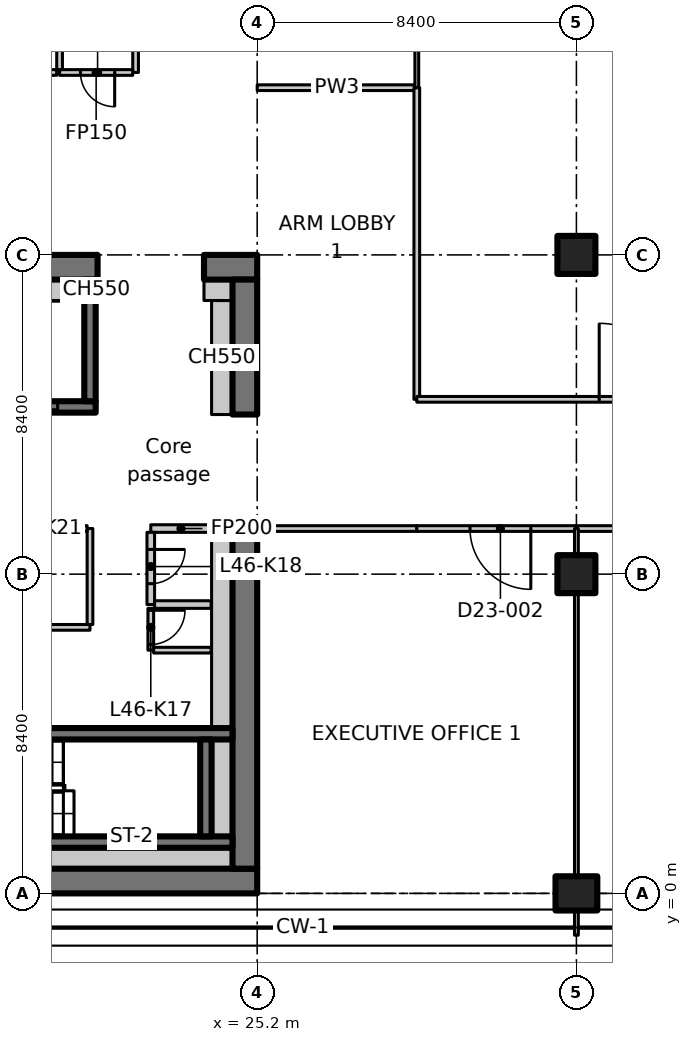
"""IFC4 building model, lengths in metres.
Left out: names, types, materials, properties, quantities, classifications, styles, units other than length and angle.
Written with IfcOpenShell. Run it as: python <this file> out.ifc"""

import sys

from ifc_helpers import new_model, si_unit, direction, frame, frame_2d, origin, origin_2d, place, context, subcontext, project, spatial, polyline, rectangle, outline, extrude, element, fill, save


model = new_model("IFC4")
c1 = context("Model", 3, precision=1e-05, world=origin(), true_north=direction((0.0, 1.0)))
c2 = subcontext(c1, "Body", "Model", "MODEL_VIEW")
j1 = project(units=[si_unit("LENGTHUNIT", "METRE"), si_unit("PLANEANGLEUNIT", "RADIAN")], contexts=[c1])
p1 = place(None, origin())
s1 = spatial("IfcSite", under=j1, at=p1, CompositionType="ELEMENT")
p2 = place(p1, origin())
s2 = spatial("IfcBuilding", under=s1, at=p2, CompositionType="ELEMENT")
p3 = place(p2, frame((0.0, 0.0, 184.8)))
s3 = spatial("IfcBuildingStorey", under=s2, at=p3, CompositionType="ELEMENT", Elevation=184.8)
p4 = place(p3, frame((33.6, 0.0, 0.0), z_axis=(0.0, 0.0, 1.0), x_axis=(0.0, 1.0, 0.0)))
e1 = element("IfcColumn", 1, at=p4, inside=s3, PredefinedType="COLUMN", context=c2, shape_type="SweptSolid", body=[
    extrude(rectangle(XDim=0.9, YDim=1.1, at=origin_2d()), origin(), (0.0, 0.0, 1.0), 3.35),
])
for number, where, z_axis, x_axis in (
    (2, (33.6, 8.4, 0.0), (0.0, 0.0, 1.0), (1.0, 0.0, 0.0)),
    (3, (33.6, 16.8, 0.0), (0.0, 0.0, 1.0), (1.0, 0.0, 0.0)),
):
    element("IfcColumn", number, at=place(p3, frame(where, z_axis=z_axis, x_axis=x_axis)), inside=s3, PredefinedType="COLUMN", context=c2, shape_type="SweptSolid", body=[
        extrude(rectangle(XDim=1.0, YDim=1.0, at=origin_2d()), origin(), (0.0, 0.0, 1.0), 3.35),
    ])
p5 = place(p3, frame((7.286, 0.325, 0.0), z_axis=(0.0, 0.0, 1.0), x_axis=(1.0, 0.0, 0.0)))
e4 = element("IfcWall", 4, at=p5, inside=s3, PredefinedType="SHEAR", context=c2, shape_type="SweptSolid", body=[
    extrude(rectangle(XDim=17.914, YDim=0.65, at=frame_2d((8.957, 0.0))), origin(), (0.0, 0.0, 1.0), 3.35),
])
p6 = place(p3, frame((-1.1, 16.475, 0.0), z_axis=(0.0, 0.0, 1.0), x_axis=(1.0, 0.0, 0.0)))
e5 = element("IfcWall", 5, at=p6, inside=s3, PredefinedType="SHEAR", context=c2, shape_type="SweptSolid", body=[
    extrude(rectangle(XDim=22.1, YDim=0.65, at=frame_2d((11.05, 0.0))), origin(), (0.0, 0.0, 1.0), 3.35),
])
p7 = place(p6, frame((3.15, 0.0, 0.0)))
e6 = element("IfcOpeningElement", 6, at=p7, cuts=e5, PredefinedType="OPENING", context=c2, shape_type="SweptSolid", body=[
    extrude(rectangle(XDim=1.1, YDim=2.3, at=frame_2d((0.55, 1.15))), frame((0.0, 0.335, 0.0), z_axis=(0.0, -1.0, 0.0), x_axis=(1.0, 0.0, 0.0)), (0.0, 0.0, 1.0), 0.67),
])
p8 = place(p3, frame((23.8, 16.475, 0.0), z_axis=(0.0, 0.0, 1.0), x_axis=(1.0, 0.0, 0.0)))
e7 = element("IfcWall", 7, at=p8, inside=s3, PredefinedType="SHEAR", context=c2, shape_type="SweptSolid", body=[
    extrude(rectangle(XDim=1.4, YDim=0.65, at=frame_2d((0.7, 0.0))), origin(), (0.0, 0.0, 1.0), 3.35),
])
p9 = place(p3, frame((24.875, 0.65, 0.0), z_axis=(0.0, 0.0, 1.0), x_axis=(0.0, 1.0, 0.0)))
e8 = element("IfcWall", 8, at=p9, inside=s3, PredefinedType="SHEAR", context=c2, shape_type="SweptSolid", body=[
    extrude(rectangle(XDim=9.15, YDim=0.65, at=frame_2d((4.575, 0.0))), origin(), (0.0, 0.0, 1.0), 3.35),
])
p10 = place(p3, frame((24.875, 12.6, 0.0), z_axis=(0.0, 0.0, 1.0), x_axis=(0.0, 1.0, 0.0)))
e9 = element("IfcWall", 9, at=p10, inside=s3, PredefinedType="SHEAR", context=c2, shape_type="SweptSolid", body=[
    extrude(rectangle(XDim=3.55, YDim=0.65, at=frame_2d((1.775, 0.0))), origin(), (0.0, 0.0, 1.0), 3.35),
])
p11 = place(p3, frame((24.275, 12.6, 0.0), z_axis=(0.0, 0.0, 1.0), x_axis=(0.0, 1.0, 0.0)))
e10 = element("IfcWall", 10, at=p11, inside=s3, PredefinedType="PARTITIONING", context=c2, shape_type="SweptSolid", body=[
    extrude(rectangle(XDim=3.0, YDim=0.55, at=frame_2d((1.5, 0.0))), origin(), (0.0, 0.0, 1.0), 3.35),
])
p12 = place(p3, frame((23.8, 15.875, 0.0), z_axis=(0.0, 0.0, 1.0), x_axis=(1.0, 0.0, 0.0)))
e11 = element("IfcWall", 11, at=p12, inside=s3, PredefinedType="PARTITIONING", context=c2, shape_type="SweptSolid", body=[
    extrude(rectangle(XDim=0.75, YDim=0.55, at=frame_2d((0.375, 0.0))), origin(), (0.0, 0.0, 1.0), 3.35),
])
p13 = place(p3, frame((17.85, 12.8, 0.0), z_axis=(0.0, 0.0, 1.0), x_axis=(1.0, 0.0, 0.0)))
e12 = element("IfcWall", 12, at=p13, inside=s3, PredefinedType="SHEAR", context=c2, shape_type="SweptSolid", body=[
    extrude(rectangle(XDim=3.1, YDim=0.3, at=frame_2d((1.55, 0.0))), origin(), (0.0, 0.0, 1.0), 3.35),
])
p14 = place(p13, frame((1.0, 0.0, 0.0)))
e13 = element("IfcOpeningElement", 13, at=p14, cuts=e12, PredefinedType="OPENING", context=c2, shape_type="SweptSolid", body=[
    extrude(rectangle(XDim=1.1, YDim=2.3, at=frame_2d((0.55, 1.15))), frame((0.0, 0.16, 0.0), z_axis=(0.0, -1.0, 0.0), x_axis=(1.0, 0.0, 0.0)), (0.0, 0.0, 1.0), 0.32),
])
p15 = place(p3, frame((20.8, 12.95, 0.0), z_axis=(0.0, 0.0, 1.0), x_axis=(0.0, 1.0, 0.0)))
e14 = element("IfcWall", 14, at=p15, inside=s3, PredefinedType="SHEAR", context=c2, shape_type="SweptSolid", body=[
    extrude(rectangle(XDim=3.2, YDim=0.3, at=frame_2d((1.6, 0.0))), origin(), (0.0, 0.0, 1.0), 3.35),
])
p16 = place(p3, frame((15.8, 1.35, 0.0), z_axis=(0.0, 0.0, 1.0), x_axis=(1.0, 0.0, 0.0)))
e15 = element("IfcWall", 15, at=p16, inside=s3, PredefinedType="SHEAR", context=c2, shape_type="SweptSolid", body=[
    extrude(rectangle(XDim=8.75, YDim=0.3, at=frame_2d((4.375, 0.0))), origin(), (0.0, 0.0, 1.0), 3.35),
])
p17 = place(p3, frame((15.8, 4.2, 0.0), z_axis=(0.0, 0.0, 1.0), x_axis=(1.0, 0.0, 0.0)))
e16 = element("IfcWall", 16, at=p17, inside=s3, PredefinedType="SHEAR", context=c2, shape_type="SweptSolid", body=[
    extrude(rectangle(XDim=8.75, YDim=0.3, at=frame_2d((4.375, 0.0))), origin(), (0.0, 0.0, 1.0), 3.35),
])
p18 = place(p17, frame((0.4, 0.0, 0.0)))
e17 = element("IfcOpeningElement", 17, at=p18, cuts=e16, PredefinedType="OPENING", context=c2, shape_type="SweptSolid", body=[
    extrude(rectangle(XDim=1.0, YDim=2.1, at=frame_2d((0.5, 1.05))), frame((0.0, 0.16, 0.0), z_axis=(0.0, -1.0, 0.0), x_axis=(1.0, 0.0, 0.0)), (0.0, 0.0, 1.0), 0.32),
])
p19 = place(p3, frame((23.85, 1.5, 0.0), z_axis=(0.0, 0.0, 1.0), x_axis=(0.0, 1.0, 0.0)))
e18 = element("IfcWall", 18, at=p19, inside=s3, PredefinedType="SHEAR", context=c2, shape_type="SweptSolid", body=[
    extrude(rectangle(XDim=2.55, YDim=0.3, at=frame_2d((1.275, 0.0))), origin(), (0.0, 0.0, 1.0), 3.35),
])
p20 = place(p3, frame((23.988, 9.6, 0.0), z_axis=(0.0, 0.0, 1.0), x_axis=(-1.0, 0.0, 0.0)))
e19 = element("IfcWall", 19, at=p20, inside=s3, PredefinedType="PARTITIONING", context=c2, shape_type="SweptSolid", body=[
    extrude(rectangle(XDim=1.588, YDim=0.2, at=frame_2d((0.794, 0.0))), origin(), (0.0, 0.0, 1.0), 3.35),
])
p21 = place(p3, frame((22.4, 9.5, 0.0), z_axis=(0.0, 0.0, 1.0), x_axis=(0.0, -1.0, 0.0)))
e20 = element("IfcWall", 20, at=p21, inside=s3, PredefinedType="PARTITIONING", context=c2, shape_type="SweptSolid", body=[
    extrude(rectangle(XDim=1.9, YDim=0.2, at=frame_2d((0.95, 0.0))), origin(), (0.0, 0.0, 1.0), 3.35),
])
p22 = place(p21, frame((0.45, 0.0, 0.0)))
e21 = element("IfcOpeningElement", 21, at=p22, cuts=e20, PredefinedType="OPENING", context=c2, shape_type="SweptSolid", body=[
    extrude(rectangle(XDim=0.9, YDim=2.1, at=frame_2d((0.45, 1.05))), frame((0.0, 0.11, 0.0), z_axis=(0.0, -1.0, 0.0), x_axis=(1.0, 0.0, 0.0)), (0.0, 0.0, 1.0), 0.22),
])
p23 = place(p3, frame((22.5, 7.6, 0.0), z_axis=(0.0, 0.0, 1.0), x_axis=(1.0, 0.0, 0.0)))
e22 = element("IfcWall", 22, at=p23, inside=s3, PredefinedType="PARTITIONING", context=c2, shape_type="SweptSolid", body=[
    extrude(rectangle(XDim=1.488, YDim=0.2, at=frame_2d((0.744, 0.0))), origin(), (0.0, 0.0, 1.0), 3.35),
])
p24 = place(p3, frame((12.5, 7.0, 0.0), z_axis=(0.0, 0.0, 1.0), x_axis=(1.0, 0.0, 0.0)))
e23 = element("IfcWall", 23, at=p24, inside=s3, PredefinedType="PARTITIONING", context=c2, shape_type="SweptSolid", body=[
    extrude(rectangle(XDim=8.3, YDim=0.15, at=frame_2d((4.15, 0.0))), origin(), (0.0, 0.0, 1.0), 3.35),
])
p25 = place(p3, frame((20.8, 7.075, 0.0), z_axis=(0.0, 0.0, 1.0), x_axis=(0.0, 1.0, 0.0)))
e24 = element("IfcWall", 24, at=p25, inside=s3, PredefinedType="PARTITIONING", context=c2, shape_type="SweptSolid", body=[
    extrude(rectangle(XDim=2.525, YDim=0.15, at=frame_2d((1.263, 0.0))), origin(), (0.0, 0.0, 1.0), 3.35),
])
p26 = place(p3, frame((20.725, 9.6, 0.0), z_axis=(0.0, 0.0, 1.0), x_axis=(-1.0, 0.0, 0.0)))
e25 = element("IfcWall", 25, at=p26, inside=s3, PredefinedType="PARTITIONING", context=c2, shape_type="SweptSolid", body=[
    extrude(rectangle(XDim=8.225, YDim=0.15, at=frame_2d((4.113, 0.0))), origin(), (0.0, 0.0, 1.0), 3.35),
])
p27 = place(p26, frame((3.675, 0.0, 0.0)))
e26 = element("IfcOpeningElement", 26, at=p27, cuts=e25, PredefinedType="OPENING", context=c2, shape_type="SweptSolid", body=[
    extrude(rectangle(XDim=0.9, YDim=2.1, at=frame_2d((0.45, 1.05))), frame((0.0, 0.085, 0.0), z_axis=(0.0, -1.0, 0.0), x_axis=(1.0, 0.0, 0.0)), (0.0, 0.0, 1.0), 0.17),
])
p28 = place(p3, frame((22.0, 23.925, 0.0), z_axis=(0.0, 0.0, 1.0), x_axis=(0.0, -1.0, 0.0)))
e27 = element("IfcWall", 27, at=p28, inside=s3, PredefinedType="PARTITIONING", context=c2, shape_type="SweptSolid", body=[
    extrude(rectangle(XDim=2.325, YDim=0.15, at=frame_2d((1.163, 0.0))), origin(), (0.0, 0.0, 1.0), 3.35),
])
p29 = place(p3, frame((21.925, 21.6, 0.0), z_axis=(0.0, 0.0, 1.0), x_axis=(-1.0, 0.0, 0.0)))
e28 = element("IfcWall", 28, at=p29, inside=s3, PredefinedType="PARTITIONING", context=c2, shape_type="SweptSolid", body=[
    extrude(rectangle(XDim=1.925, YDim=0.15, at=frame_2d((0.962, 0.0))), origin(), (0.0, 0.0, 1.0), 3.35),
])
p30 = place(p29, frame((0.475, 0.0, 0.0)))
e29 = element("IfcOpeningElement", 29, at=p30, cuts=e28, PredefinedType="OPENING", context=c2, shape_type="SweptSolid", body=[
    extrude(rectangle(XDim=0.9, YDim=2.1, at=frame_2d((0.45, 1.05))), frame((0.0, 0.085, 0.0), z_axis=(0.0, -1.0, 0.0), x_axis=(1.0, 0.0, 0.0)), (0.0, 0.0, 1.0), 0.17),
])
p31 = place(p3, frame((20.0, 21.675, 0.0), z_axis=(0.0, 0.0, 1.0), x_axis=(0.0, 1.0, 0.0)))
e30 = element("IfcWall", 30, at=p31, inside=s3, PredefinedType="PARTITIONING", context=c2, shape_type="SweptSolid", body=[
    extrude(rectangle(XDim=2.25, YDim=0.15, at=frame_2d((1.125, 0.0))), origin(), (0.0, 0.0, 1.0), 3.35),
])
p32 = place(p3, frame((19.925, 21.6, 0.0), z_axis=(0.0, 0.0, 1.0), x_axis=(-1.0, 0.0, 0.0)))
e31 = element("IfcWall", 31, at=p32, inside=s3, PredefinedType="PARTITIONING", context=c2, shape_type="SweptSolid", body=[
    extrude(rectangle(XDim=2.325, YDim=0.15, at=frame_2d((1.163, 0.0))), origin(), (0.0, 0.0, 1.0), 3.35),
])
p33 = place(p32, frame((0.675, 0.0, 0.0)))
e32 = element("IfcOpeningElement", 32, at=p33, cuts=e31, PredefinedType="OPENING", context=c2, shape_type="SweptSolid", body=[
    extrude(rectangle(XDim=0.9, YDim=2.1, at=frame_2d((0.45, 1.05))), frame((0.0, 0.085, 0.0), z_axis=(0.0, -1.0, 0.0), x_axis=(1.0, 0.0, 0.0)), (0.0, 0.0, 1.0), 0.17),
])
p34 = place(p3, frame((22.4, 7.5, 0.0), z_axis=(0.0, 0.0, 1.0), x_axis=(0.0, -1.0, 0.0)))
e33 = element("IfcWall", 33, at=p34, inside=s3, PredefinedType="PARTITIONING", context=c2, shape_type="SweptSolid", body=[
    extrude(rectangle(XDim=1.1, YDim=0.15, at=frame_2d((0.55, 0.0))), origin(), (0.0, 0.0, 1.0), 3.35),
])
p35 = place(p34, frame((0.05, 0.0, 0.0)))
e34 = element("IfcOpeningElement", 34, at=p35, cuts=e33, PredefinedType="OPENING", context=c2, shape_type="SweptSolid", body=[
    extrude(rectangle(XDim=0.9, YDim=2.1, at=frame_2d((0.45, 1.05))), frame((0.0, 0.085, 0.0), z_axis=(0.0, -1.0, 0.0), x_axis=(1.0, 0.0, 0.0)), (0.0, 0.0, 1.0), 0.17),
])
p36 = place(p3, frame((22.475, 6.4, 0.0), z_axis=(0.0, 0.0, 1.0), x_axis=(1.0, 0.0, 0.0)))
e35 = element("IfcWall", 35, at=p36, inside=s3, PredefinedType="PARTITIONING", context=c2, shape_type="SweptSolid", body=[
    extrude(rectangle(XDim=1.513, YDim=0.15, at=frame_2d((0.756, 0.0))), origin(), (0.0, 0.0, 1.0), 3.35),
])
p37 = place(p3, frame((18.15, 15.875, 0.0), z_axis=(0.0, 0.0, 1.0), x_axis=(1.0, 0.0, 0.0)))
e36 = element("IfcWall", 36, at=p37, inside=s3, PredefinedType="PARTITIONING", context=c2, shape_type="SweptSolid", body=[
    extrude(rectangle(XDim=2.5, YDim=0.55, at=frame_2d((1.25, 0.0))), origin(), (0.0, 0.0, 1.0), 3.35),
])
p38 = place(p3, frame((20.95, 15.875, 0.0), z_axis=(0.0, 0.0, 1.0), x_axis=(1.0, 0.0, 0.0)))
e37 = element("IfcWall", 37, at=p38, inside=s3, PredefinedType="PARTITIONING", context=c2, shape_type="SweptSolid", body=[
    extrude(rectangle(XDim=0.05, YDim=0.55, at=frame_2d((0.025, 0.0))), origin(), (0.0, 0.0, 1.0), 3.35),
])
p39 = place(p3, frame((13.35, 0.925, 0.0), z_axis=(0.0, 0.0, 1.0), x_axis=(1.0, 0.0, 0.0)))
e38 = element("IfcWall", 38, at=p39, inside=s3, PredefinedType="PARTITIONING", context=c2, shape_type="SweptSolid", body=[
    extrude(rectangle(XDim=11.2, YDim=0.55, at=frame_2d((5.6, 0.0))), origin(), (0.0, 0.0, 1.0), 3.35),
])
p40 = place(p3, frame((24.275, 1.5, 0.0), z_axis=(0.0, 0.0, 1.0), x_axis=(0.0, 1.0, 0.0)))
e39 = element("IfcWall", 39, at=p40, inside=s3, PredefinedType="PARTITIONING", context=c2, shape_type="SweptSolid", body=[
    extrude(rectangle(XDim=2.55, YDim=0.55, at=frame_2d((1.275, 0.0))), origin(), (0.0, 0.0, 1.0), 3.35),
])
p41 = place(p3, frame((24.275, 4.35, 0.0), z_axis=(0.0, 0.0, 1.0), x_axis=(0.0, 1.0, 0.0)))
e40 = element("IfcWall", 40, at=p41, inside=s3, PredefinedType="PARTITIONING", context=c2, shape_type="SweptSolid", body=[
    extrude(rectangle(XDim=5.45, YDim=0.55, at=frame_2d((2.725, 0.0))), origin(), (0.0, 0.0, 1.0), 3.35),
])
for number, where, z_axis, x_axis in (
    (41, (25.2, 21.2, 0.0), (0.0, 0.0, 1.0), (1.0, 0.0, 0.0)),
    (42, (29.4, 9.6, 0.0), (0.0, 0.0, 1.0), (-1.0, 0.0, 0.0)),
):
    element("IfcWall", number, at=place(p3, frame(where, z_axis=z_axis, x_axis=x_axis)), inside=s3, PredefinedType="PARTITIONING", context=c2, shape_type="SweptSolid", body=[
        extrude(rectangle(XDim=4.2, YDim=0.15, at=frame_2d((2.1, 0.0))), origin(), (0.0, 0.0, 1.0), 3.33),
    ])
p42 = place(p3, frame((29.4, 21.2, 0.0), z_axis=(0.0, 0.0, 1.0), x_axis=(0.0, -1.0, 0.0)))
e43 = element("IfcWall", 43, at=p42, inside=s3, PredefinedType="PARTITIONING", context=c2, shape_type="SweptSolid", body=[
    extrude(rectangle(XDim=8.2, YDim=0.15, at=frame_2d((4.1, 0.0))), origin(), (0.0, 0.0, 1.0), 3.33),
])
p43 = place(p3, frame((29.4, 27.429, 0.0), z_axis=(0.0, 0.0, 1.0), x_axis=(0.0, -1.0, 0.0)))
e44 = element("IfcWall", 44, at=p43, inside=s3, PredefinedType="PARTITIONING", context=c2, shape_type="SweptSolid", body=[
    extrude(outline(polyline([(0.0, 0.0), (6.229, 0.0), (6.229, 3.33), (2.679, 3.33), (2.677, 2.98), (1.781, 2.98), (1.779, 3.33), (0.154, 3.33), (0.0, 3.33), (0.0, 0.0)])), frame((0.0, 0.05, 0.0), z_axis=(0.0, -1.0, 0.0), x_axis=(1.0, 0.0, 0.0)), (0.0, 0.0, 1.0), 0.1),
])
p44 = place(p3, frame((33.6, 9.6, 0.0), z_axis=(0.0, 0.0, 1.0), x_axis=(-1.0, 0.0, 0.0)))
e45 = element("IfcWall", 45, at=p44, inside=s3, PredefinedType="PARTITIONING", context=c2, shape_type="SweptSolid", body=[
    extrude(rectangle(XDim=4.2, YDim=0.15, at=frame_2d((2.1, 0.0))), origin(), (0.0, 0.0, 1.0), 3.33),
])
p45 = place(p44, frame((1.2, 0.0, 0.0)))
e46 = element("IfcOpeningElement", 46, at=p45, cuts=e45, PredefinedType="OPENING", context=c2, shape_type="SweptSolid", body=[
    extrude(rectangle(XDim=1.6, YDim=2.1, at=frame_2d((0.8, 1.05))), frame((0.0, 0.085, 0.0), z_axis=(0.0, -1.0, 0.0), x_axis=(1.0, 0.0, 0.0)), (0.0, 0.0, 1.0), 0.17),
])
p46 = place(p3, frame((42.0, 9.6, 0.0), z_axis=(0.0, 0.0, 1.0), x_axis=(-1.0, 0.0, 0.0)))
e47 = element("IfcWall", 47, at=p46, inside=s3, PredefinedType="PARTITIONING", context=c2, shape_type="SweptSolid", body=[
    extrude(rectangle(XDim=8.4, YDim=0.15, at=frame_2d((4.2, 0.0))), origin(), (0.0, 0.0, 1.0), 3.33),
])
p47 = place(p46, frame((3.3, 0.0, 0.0)))
e48 = element("IfcOpeningElement", 48, at=p47, cuts=e47, PredefinedType="OPENING", context=c2, shape_type="SweptSolid", body=[
    extrude(rectangle(XDim=1.6, YDim=2.1, at=frame_2d((0.8, 1.05))), frame((0.0, 0.085, 0.0), z_axis=(0.0, -1.0, 0.0), x_axis=(1.0, 0.0, 0.0)), (0.0, 0.0, 1.0), 0.17),
])
p48 = place(p3, frame((29.4, 13.0, 0.0), z_axis=(0.0, 0.0, 1.0), x_axis=(1.0, 0.0, 0.0)))
e49 = element("IfcWall", 49, at=p48, inside=s3, PredefinedType="PARTITIONING", context=c2, shape_type="SweptSolid", body=[
    extrude(rectangle(XDim=11.8, YDim=0.15, at=frame_2d((5.9, 0.0))), origin(), (0.0, 0.0, 1.0), 3.33),
])
p49 = place(p48, frame((4.8, 0.0, 0.0)))
e50 = element("IfcOpeningElement", 50, at=p49, cuts=e49, PredefinedType="OPENING", context=c2, shape_type="SweptSolid", body=[
    extrude(rectangle(XDim=2.0, YDim=2.4, at=frame_2d((1.0, 1.2))), frame((0.0, 0.085, 0.0), z_axis=(0.0, -1.0, 0.0), x_axis=(1.0, 0.0, 0.0)), (0.0, 0.0, 1.0), 0.17),
])
p50 = place(p3, frame((33.6, 9.6, 0.0), z_axis=(0.0, 0.0, 1.0), x_axis=(0.0, -1.0, 0.0)))
e51 = element("IfcWall", 51, at=p50, inside=s3, PredefinedType="PARTITIONING", context=c2, shape_type="SweptSolid", body=[
    extrude(rectangle(XDim=0.68, YDim=0.1, at=frame_2d((0.34, 0.0))), origin(), (0.0, 0.0, 1.0), 3.33),
])
p51 = place(p3, frame((33.6, 7.88, 0.0), z_axis=(0.0, 0.0, 1.0), x_axis=(0.0, -1.0, 0.0)))
e52 = element("IfcWall", 52, at=p51, inside=s3, PredefinedType="PARTITIONING", context=c2, shape_type="SweptSolid", body=[
    extrude(rectangle(XDim=7.41, YDim=0.1, at=frame_2d((3.705, 0.0))), origin(), (0.0, 0.0, 1.0), 3.33),
])
p52 = place(p3, frame((33.6, -0.47, 0.0), z_axis=(0.0, 0.0, 1.0), x_axis=(0.0, -1.0, 0.0)))
e53 = element("IfcWall", 53, at=p52, inside=s3, PredefinedType="PARTITIONING", context=c2, shape_type="SweptSolid", body=[
    extrude(rectangle(XDim=0.63, YDim=0.1, at=frame_2d((0.315, 0.0))), origin(), (0.0, 0.0, 1.0), 3.33),
])
p53 = place(p14, origin())
e54 = element("IfcDoor", 54, at=p53, inside=s3, OperationType="SLIDING_TO_LEFT", PredefinedType="DOOR", context=c2, shape_type="SweptSolid", body=[
    extrude(rectangle(XDim=1.1, YDim=2.3, at=frame_2d((0.55, 1.15))), frame((0.0, 0.025, 0.0), z_axis=(0.0, -1.0, 0.0), x_axis=(1.0, 0.0, 0.0)), (0.0, 0.0, 1.0), 0.05),
])
fill(e13, e54)
p54 = place(p35, origin())
e55 = element("IfcDoor", 55, at=p54, inside=s3, OperationType="SINGLE_SWING_RIGHT", PredefinedType="DOOR", context=c2, shape_type="SweptSolid", body=[
    extrude(rectangle(XDim=0.9, YDim=2.1, at=frame_2d((0.45, 1.05))), frame((0.0, 0.025, 0.0), z_axis=(0.0, -1.0, 0.0), x_axis=(1.0, 0.0, 0.0)), (0.0, 0.0, 1.0), 0.05),
])
fill(e34, e55)
p55 = place(p22, origin())
e56 = element("IfcDoor", 56, at=p55, inside=s3, OperationType="SINGLE_SWING_LEFT", PredefinedType="DOOR", context=c2, shape_type="SweptSolid", body=[
    extrude(rectangle(XDim=0.9, YDim=2.1, at=frame_2d((0.45, 1.05))), frame((0.0, 0.025, 0.0), z_axis=(0.0, -1.0, 0.0), x_axis=(1.0, 0.0, 0.0)), (0.0, 0.0, 1.0), 0.05),
])
fill(e21, e56)
p56 = place(p30, origin())
e57 = element("IfcDoor", 57, at=p56, inside=s3, OperationType="SINGLE_SWING_RIGHT", PredefinedType="DOOR", context=c2, shape_type="SweptSolid", body=[
    extrude(rectangle(XDim=0.9, YDim=2.1, at=frame_2d((0.45, 1.05))), frame((0.0, 0.025, 0.0), z_axis=(0.0, -1.0, 0.0), x_axis=(1.0, 0.0, 0.0)), (0.0, 0.0, 1.0), 0.05),
])
fill(e29, e57)
p57 = place(p45, origin())
e58 = element("IfcDoor", 58, at=p57, inside=s3, OperationType="DOUBLE_DOOR_SINGLE_SWING", PredefinedType="DOOR", context=c2, shape_type="SweptSolid", body=[
    extrude(rectangle(XDim=1.6, YDim=2.1, at=frame_2d((0.8, 1.05))), frame((0.0, 0.025, 0.0), z_axis=(0.0, -1.0, 0.0), x_axis=(1.0, 0.0, 0.0)), (0.0, 0.0, 1.0), 0.05),
])
fill(e46, e58)
p58 = place(p49, origin())
e59 = element("IfcDoor", 59, at=p58, inside=s3, OperationType="DOUBLE_DOOR_SINGLE_SWING", PredefinedType="DOOR", context=c2, shape_type="SweptSolid", body=[
    extrude(rectangle(XDim=2.0, YDim=2.4, at=frame_2d((1.0, 1.2))), frame((0.0, 0.025, 0.0), z_axis=(0.0, -1.0, 0.0), x_axis=(1.0, 0.0, 0.0)), (0.0, 0.0, 1.0), 0.05),
])
fill(e50, e59)
save(model, sys.argv[1])
